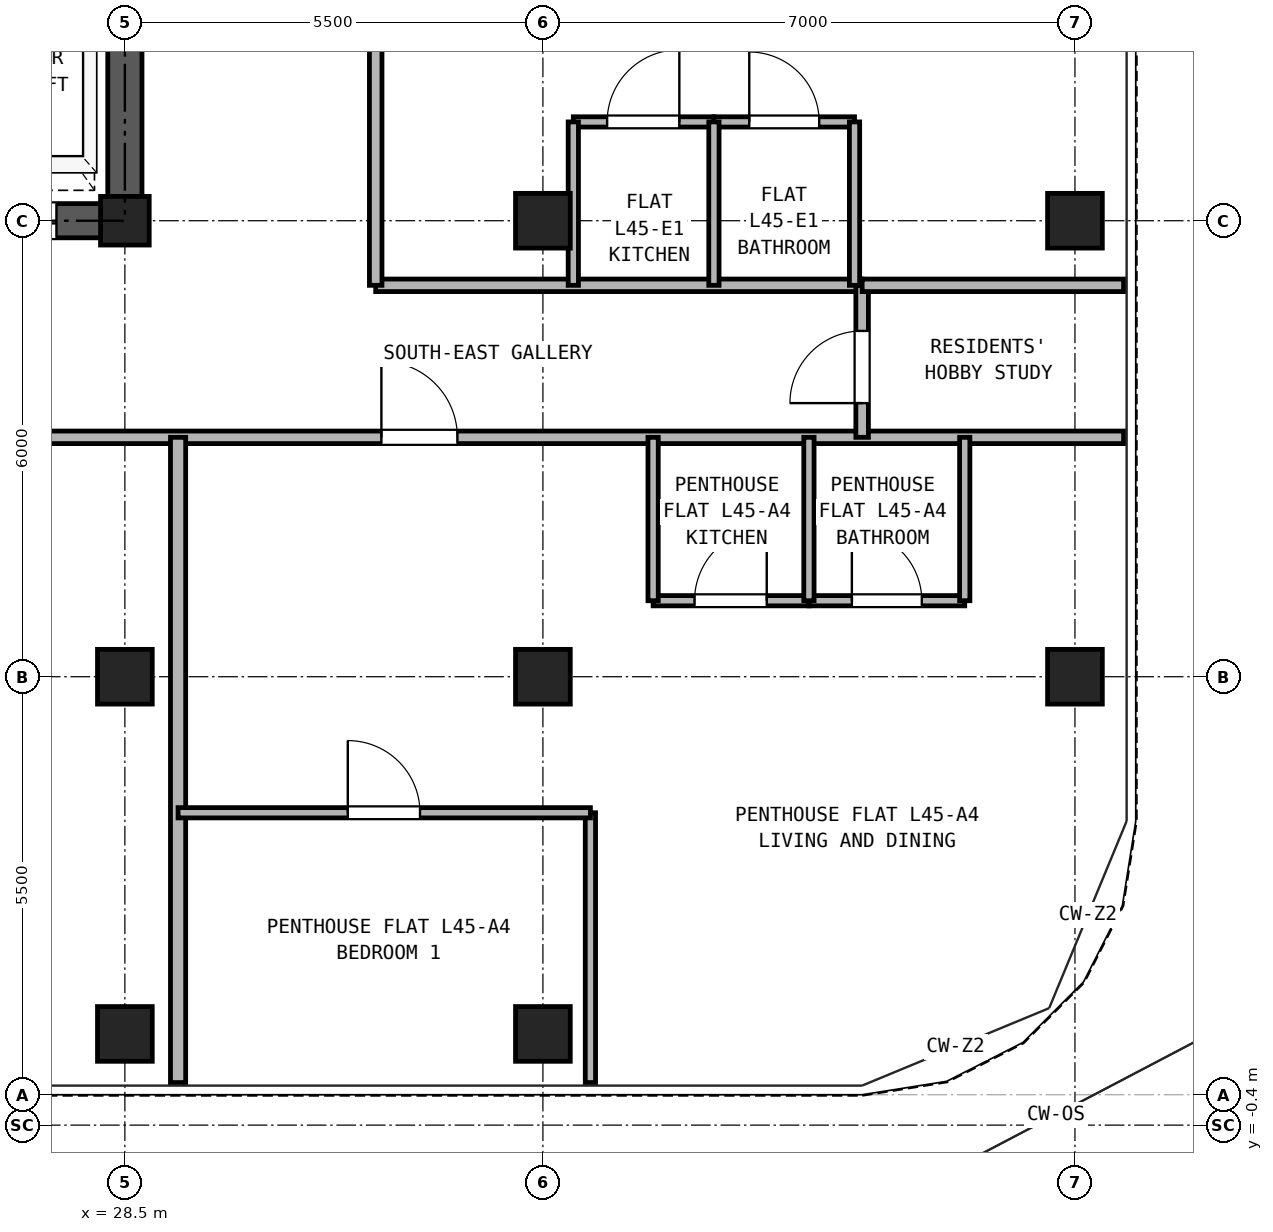
"""IFC4 building model, lengths in metres.
Left out: names, types, materials, properties, quantities, classifications, styles, units other than length and angle.
Written with IfcOpenShell. Run it as: python <this file> out.ifc"""

import sys

from ifc_helpers import new_model, si_unit, direction, frame, frame_2d, origin, origin_2d, place, context, subcontext, project, spatial, rectangle, hollow_rectangle, extrude, source, transform, mapped, element, fill, save


model = new_model("IFC4")
c1 = context("Model", 3, precision=1e-05, world=origin(), true_north=direction((0.0, 1.0)))
c2 = subcontext(c1, "Body", "Model", "MODEL_VIEW")
j1 = project(units=[si_unit("LENGTHUNIT", "METRE"), si_unit("PLANEANGLEUNIT", "RADIAN")], contexts=[c1])
p1 = place(None, origin())
s1 = spatial("IfcSite", under=j1, at=p1, CompositionType="ELEMENT")
p2 = place(p1, origin())
s2 = spatial("IfcBuilding", under=s1, at=p2, CompositionType="ELEMENT")
p3 = place(p2, frame((0.0, 0.0, 162.5)))
s3 = spatial("IfcBuildingStorey", under=s2, at=p3, CompositionType="ELEMENT", Elevation=162.5)
m1 = source(origin(), c2, "Body", "SweptSolid", [
    extrude(hollow_rectangle(XDim=0.72, YDim=0.72, WallThickness=0.04, at=origin_2d()), origin(), (0.0, 0.0, 1.0), 2.95),
])
for number, where, z_axis, x_axis in (
    (1, (28.5, 0.8, 0.0), (0.0, 0.0, 1.0), (1.0, 0.0, 0.0)),
    (2, (34.0, 0.8, 0.0), (0.0, 0.0, 1.0), (1.0, 0.0, 0.0)),
    (3, (41.0, 5.5, 0.0), (0.0, 0.0, 1.0), (1.0, 0.0, 0.0)),
    (4, (41.0, 11.5, 0.0), (0.0, 0.0, 1.0), (1.0, 0.0, 0.0)),
    (5, (28.5, 5.5, 0.0), (0.0, 0.0, 1.0), (1.0, 0.0, 0.0)),
):
    element("IfcColumn", number, at=place(p3, frame(where, z_axis=z_axis, x_axis=x_axis)), inside=s3, PredefinedType="COLUMN", context=c2, shape_type="MappedRepresentation", body=[
        mapped(m1, transform((0.0, 0.0, 0.0), x_axis=(1.0, 0.0, 0.0), y_axis=(0.0, 1.0, 0.0), z_axis=(0.0, 0.0, 1.0), scale=1.0)),
    ])
m2 = source(origin(), c2, "Body", "SweptSolid", [
    extrude(hollow_rectangle(XDim=0.64, YDim=0.64, WallThickness=0.035, at=origin_2d()), origin(), (0.0, 0.0, 1.0), 2.95),
])
p4 = place(p3, frame((28.5, 11.5, 0.0), z_axis=(0.0, 0.0, 1.0), x_axis=(1.0, 0.0, 0.0)))
e6 = element("IfcColumn", 6, at=p4, inside=s3, PredefinedType="COLUMN", context=c2, shape_type="MappedRepresentation", body=[
    mapped(m2, transform((0.0, 0.0, 0.0), x_axis=(1.0, 0.0, 0.0), y_axis=(0.0, 1.0, 0.0), z_axis=(0.0, 0.0, 1.0), scale=1.0)),
])
for number, where, z_axis, x_axis in (
    (7, (34.0, 5.5, 0.0), (0.0, 0.0, 1.0), (1.0, 0.0, 0.0)),
    (8, (34.0, 11.5, 0.0), (0.0, 0.0, 1.0), (1.0, 0.0, 0.0)),
):
    element("IfcColumn", number, at=place(p3, frame(where, z_axis=z_axis, x_axis=x_axis)), inside=s3, PredefinedType="COLUMN", context=c2, shape_type="MappedRepresentation", body=[
        mapped(m1, transform((0.0, 0.0, 0.0), x_axis=(1.0, 0.0, 0.0), y_axis=(0.0, 1.0, 0.0), z_axis=(0.0, 0.0, 1.0), scale=1.0)),
    ])
p5 = place(p3, frame((18.275, 11.5, 0.0), z_axis=(0.0, 0.0, 1.0), x_axis=(1.0, 0.0, 0.0)))
e9 = element("IfcWall", 9, at=p5, inside=s3, PredefinedType="SHEAR", context=c2, shape_type="SweptSolid", body=[
    extrude(rectangle(XDim=10.45, YDim=0.45, at=frame_2d((5.225, 0.0))), origin(), (0.0, 0.0, 1.0), 2.95),
])
p6 = place(p5, frame((1.825, 0.0, 0.0)))
e10 = element("IfcOpeningElement", 10, at=p6, cuts=e9, PredefinedType="OPENING", context=c2, shape_type="SweptSolid", body=[
    extrude(rectangle(XDim=0.95, YDim=2.15, at=frame_2d((0.475, 1.075))), frame((0.0, 0.235, 0.0), z_axis=(0.0, -1.0, 0.0), x_axis=(1.0, 0.0, 0.0)), (0.0, 0.0, 1.0), 0.47),
])
p7 = place(p5, frame((5.325, 0.0, 0.0)))
e11 = element("IfcOpeningElement", 11, at=p7, cuts=e9, PredefinedType="OPENING", context=c2, shape_type="SweptSolid", body=[
    extrude(rectangle(XDim=0.95, YDim=2.15, at=frame_2d((0.475, 1.075))), frame((0.0, 0.235, 0.0), z_axis=(0.0, -1.0, 0.0), x_axis=(1.0, 0.0, 0.0)), (0.0, 0.0, 1.0), 0.47),
])
p8 = place(p5, frame((8.225, 0.0, 0.0)))
e12 = element("IfcOpeningElement", 12, at=p8, cuts=e9, PredefinedType="OPENING", context=c2, shape_type="SweptSolid", body=[
    extrude(rectangle(XDim=1.1, YDim=2.25, at=frame_2d((0.55, 1.125))), frame((0.0, 0.235, 0.0), z_axis=(0.0, -1.0, 0.0), x_axis=(1.0, 0.0, 0.0)), (0.0, 0.0, 1.0), 0.47),
])
p9 = place(p3, frame((28.5, 11.725, 0.0), z_axis=(0.0, 0.0, 1.0), x_axis=(0.0, 1.0, 0.0)))
e13 = element("IfcWall", 13, at=p9, inside=s3, PredefinedType="SHEAR", context=c2, shape_type="SweptSolid", body=[
    extrude(rectangle(XDim=16.8, YDim=0.45, at=frame_2d((8.4, 0.0))), origin(), (0.0, 0.0, 1.0), 2.95),
])
p10 = place(p9, frame((7.425, 0.0, 0.0)))
e14 = element("IfcOpeningElement", 14, at=p10, cuts=e13, PredefinedType="OPENING", context=c2, shape_type="SweptSolid", body=[
    extrude(rectangle(XDim=1.15, YDim=2.2, at=frame_2d((0.575, 1.1))), frame((0.0, 0.235, 0.0), z_axis=(0.0, -1.0, 0.0), x_axis=(1.0, 0.0, 0.0)), (0.0, 0.0, 1.0), 0.47),
])
p11 = place(p3, frame((0.16, 8.65, 0.0), z_axis=(0.0, 0.0, 1.0), x_axis=(1.0, 0.0, 0.0)))
e15 = element("IfcWall", 15, at=p11, inside=s3, PredefinedType="PARTITIONING", context=c2, shape_type="SweptSolid", body=[
    extrude(rectangle(XDim=41.48, YDim=0.165, at=frame_2d((20.74, 0.0))), origin(), (0.0, 0.0, 1.0), 2.583),
])
p12 = place(p11, frame((9.39, 0.0, 0.0)))
e16 = element("IfcOpeningElement", 16, at=p12, cuts=e15, PredefinedType="OPENING", context=c2, shape_type="SweptSolid", body=[
    extrude(rectangle(XDim=1.0, YDim=2.15, at=frame_2d((0.5, 1.075))), frame((0.0, 0.093, 0.0), z_axis=(0.0, -1.0, 0.0), x_axis=(1.0, 0.0, 0.0)), (0.0, 0.0, 1.0), 0.185),
])
p13 = place(p11, frame((18.965, 0.0, 0.0)))
e17 = element("IfcOpeningElement", 17, at=p13, cuts=e15, PredefinedType="OPENING", context=c2, shape_type="SweptSolid", body=[
    extrude(rectangle(XDim=1.0, YDim=2.15, at=frame_2d((0.5, 1.075))), frame((0.0, 0.093, 0.0), z_axis=(0.0, -1.0, 0.0), x_axis=(1.0, 0.0, 0.0)), (0.0, 0.0, 1.0), 0.185),
])
p14 = place(p11, frame((26.34, 0.0, 0.0)))
e18 = element("IfcOpeningElement", 18, at=p14, cuts=e15, PredefinedType="OPENING", context=c2, shape_type="SweptSolid", body=[
    extrude(rectangle(XDim=1.0, YDim=2.15, at=frame_2d((0.5, 1.075))), frame((0.0, 0.093, 0.0), z_axis=(0.0, -1.0, 0.0), x_axis=(1.0, 0.0, 0.0)), (0.0, 0.0, 1.0), 0.185),
])
p15 = place(p11, frame((31.715, 0.0, 0.0)))
e19 = element("IfcOpeningElement", 19, at=p15, cuts=e15, PredefinedType="OPENING", context=c2, shape_type="SweptSolid", body=[
    extrude(rectangle(XDim=1.0, YDim=2.15, at=frame_2d((0.5, 1.075))), frame((0.0, 0.093, 0.0), z_axis=(0.0, -1.0, 0.0), x_axis=(1.0, 0.0, 0.0)), (0.0, 0.0, 1.0), 0.185),
])
p16 = place(p3, frame((31.8, 10.65, 0.0), z_axis=(0.0, 0.0, 1.0), x_axis=(1.0, 0.0, 0.0)))
e20 = element("IfcWall", 20, at=p16, inside=s3, PredefinedType="PARTITIONING", context=c2, shape_type="SweptSolid", body=[
    extrude(rectangle(XDim=6.4, YDim=0.165, at=frame_2d((3.2, 0.0))), origin(), (0.0, 0.0, 1.0), 2.95),
])
p17 = place(p3, frame((38.2, 8.65, 0.0), z_axis=(0.0, 0.0, 1.0), x_axis=(0.0, 1.0, 0.0)))
e21 = element("IfcWall", 21, at=p17, inside=s3, PredefinedType="PARTITIONING", context=c2, shape_type="SweptSolid", body=[
    extrude(rectangle(XDim=2.0, YDim=0.165, at=frame_2d((1.0, 0.0))), origin(), (0.0, 0.0, 1.0), 2.95),
])
p18 = place(p17, frame((0.45, 0.0, 0.0)))
e22 = element("IfcOpeningElement", 22, at=p18, cuts=e21, PredefinedType="OPENING", context=c2, shape_type="SweptSolid", body=[
    extrude(rectangle(XDim=0.95, YDim=2.15, at=frame_2d((0.475, 1.075))), frame((0.0, 0.093, 0.0), z_axis=(0.0, -1.0, 0.0), x_axis=(1.0, 0.0, 0.0)), (0.0, 0.0, 1.0), 0.185),
])
p19 = place(p3, frame((31.8, 10.65, 0.0), z_axis=(0.0, 0.0, 1.0), x_axis=(0.0, 1.0, 0.0)))
e23 = element("IfcWall", 23, at=p19, inside=s3, PredefinedType="PARTITIONING", context=c2, shape_type="SweptSolid", body=[
    extrude(rectangle(XDim=24.49, YDim=0.165, at=frame_2d((12.245, 0.0))), origin(), (0.0, 0.0, 1.0), 2.95),
])
p20 = place(p19, frame((3.425, 0.0, 0.0)))
e24 = element("IfcOpeningElement", 24, at=p20, cuts=e23, PredefinedType="OPENING", context=c2, shape_type="SweptSolid", body=[
    extrude(rectangle(XDim=1.0, YDim=2.15, at=frame_2d((0.5, 1.075))), frame((0.0, 0.093, 0.0), z_axis=(0.0, -1.0, 0.0), x_axis=(1.0, 0.0, 0.0)), (0.0, 0.0, 1.0), 0.185),
])
p21 = place(p19, frame((11.6, 0.0, 0.0)))
e25 = element("IfcOpeningElement", 25, at=p21, cuts=e23, PredefinedType="OPENING", context=c2, shape_type="SweptSolid", body=[
    extrude(rectangle(XDim=1.0, YDim=2.15, at=frame_2d((0.5, 1.075))), frame((0.0, 0.093, 0.0), z_axis=(0.0, -1.0, 0.0), x_axis=(1.0, 0.0, 0.0)), (0.0, 0.0, 1.0), 0.185),
])
p22 = place(p19, frame((18.25, 0.0, 0.0)))
e26 = element("IfcOpeningElement", 26, at=p22, cuts=e23, PredefinedType="OPENING", context=c2, shape_type="SweptSolid", body=[
    extrude(rectangle(XDim=1.0, YDim=2.15, at=frame_2d((0.5, 1.075))), frame((0.0, 0.093, 0.0), z_axis=(0.0, -1.0, 0.0), x_axis=(1.0, 0.0, 0.0)), (0.0, 0.0, 1.0), 0.185),
])
p23 = place(p3, frame((29.2, 0.16, 0.0), z_axis=(0.0, 0.0, 1.0), x_axis=(0.0, 1.0, 0.0)))
e27 = element("IfcWall", 27, at=p23, inside=s3, PredefinedType="PARTITIONING", context=c2, shape_type="SweptSolid", body=[
    extrude(rectangle(XDim=8.49, YDim=0.2, at=frame_2d((4.245, 0.0))), origin(), (0.0, 0.0, 1.0), 2.95),
])
p24 = place(p3, frame((35.45, 6.5, 0.0), z_axis=(0.0, 0.0, 1.0), x_axis=(1.0, 0.0, 0.0)))
e28 = element("IfcWall", 28, at=p24, inside=s3, PredefinedType="PARTITIONING", context=c2, shape_type="SweptSolid", body=[
    extrude(rectangle(XDim=2.05, YDim=0.135, at=frame_2d((1.025, 0.0))), origin(), (0.0, 0.0, 1.0), 2.95),
])
p25 = place(p24, frame((0.545, 0.0, 0.0)))
e29 = element("IfcOpeningElement", 29, at=p25, cuts=e28, PredefinedType="OPENING", context=c2, shape_type="SweptSolid", body=[
    extrude(rectangle(XDim=0.95, YDim=2.15, at=frame_2d((0.475, 1.075))), frame((0.0, 0.077, 0.0), z_axis=(0.0, -1.0, 0.0), x_axis=(1.0, 0.0, 0.0)), (0.0, 0.0, 1.0), 0.155),
])
p26 = place(p3, frame((37.5, 6.5, 0.0), z_axis=(0.0, 0.0, 1.0), x_axis=(1.0, 0.0, 0.0)))
e30 = element("IfcWall", 30, at=p26, inside=s3, PredefinedType="PARTITIONING", context=c2, shape_type="SweptSolid", body=[
    extrude(rectangle(XDim=2.05, YDim=0.135, at=frame_2d((1.025, 0.0))), origin(), (0.0, 0.0, 1.0), 2.95),
])
p27 = place(p26, frame((0.565, 0.0, 0.0)))
e31 = element("IfcOpeningElement", 31, at=p27, cuts=e30, PredefinedType="OPENING", context=c2, shape_type="SweptSolid", body=[
    extrude(rectangle(XDim=0.92, YDim=2.1, at=frame_2d((0.46, 1.05))), frame((0.0, 0.077, 0.0), z_axis=(0.0, -1.0, 0.0), x_axis=(1.0, 0.0, 0.0)), (0.0, 0.0, 1.0), 0.155),
])
for number, where, z_axis, x_axis in (
    (32, (35.45, 6.5, 0.0), (0.0, 0.0, 1.0), (0.0, 1.0, 0.0)),
    (33, (37.5, 6.5, 0.0), (0.0, 0.0, 1.0), (0.0, 1.0, 0.0)),
    (34, (39.55, 6.5, 0.0), (0.0, 0.0, 1.0), (0.0, 1.0, 0.0)),
):
    element("IfcWall", number, at=place(p3, frame(where, z_axis=z_axis, x_axis=x_axis)), inside=s3, PredefinedType="PARTITIONING", context=c2, shape_type="SweptSolid", body=[
        extrude(rectangle(XDim=2.15, YDim=0.135, at=frame_2d((1.075, 0.0))), origin(), (0.0, 0.0, 1.0), 2.95),
    ])
p28 = place(p3, frame((34.625, 0.16, 0.0), z_axis=(0.0, 0.0, 1.0), x_axis=(0.0, 1.0, 0.0)))
e35 = element("IfcWall", 35, at=p28, inside=s3, PredefinedType="PARTITIONING", context=c2, shape_type="SweptSolid", body=[
    extrude(rectangle(XDim=3.55, YDim=0.135, at=frame_2d((1.775, 0.0))), origin(), (0.0, 0.0, 1.0), 2.95),
])
p29 = place(p3, frame((29.2, 3.71, 0.0), z_axis=(0.0, 0.0, 1.0), x_axis=(1.0, 0.0, 0.0)))
e36 = element("IfcWall", 36, at=p29, inside=s3, PredefinedType="PARTITIONING", context=c2, shape_type="SweptSolid", body=[
    extrude(rectangle(XDim=5.425, YDim=0.135, at=frame_2d((2.712, 0.0))), origin(), (0.0, 0.0, 1.0), 2.95),
])
p30 = place(p29, frame((2.233, 0.0, 0.0)))
e37 = element("IfcOpeningElement", 37, at=p30, cuts=e36, PredefinedType="OPENING", context=c2, shape_type="SweptSolid", body=[
    extrude(rectangle(XDim=0.95, YDim=2.15, at=frame_2d((0.475, 1.075))), frame((0.0, 0.077, 0.0), z_axis=(0.0, -1.0, 0.0), x_axis=(1.0, 0.0, 0.0)), (0.0, 0.0, 1.0), 0.155),
])
p31 = place(p3, frame((38.2, 10.65, 0.0), z_axis=(0.0, 0.0, 1.0), x_axis=(1.0, 0.0, 0.0)))
e38 = element("IfcWall", 38, at=p31, inside=s3, PredefinedType="PARTITIONING", context=c2, shape_type="SweptSolid", body=[
    extrude(rectangle(XDim=3.44, YDim=0.165, at=frame_2d((1.72, 0.0))), origin(), (0.0, 0.0, 1.0), 2.95),
])
p32 = place(p3, frame((34.4, 12.8, 0.0), z_axis=(0.0, 0.0, 1.0), x_axis=(1.0, 0.0, 0.0)))
e39 = element("IfcWall", 39, at=p32, inside=s3, PredefinedType="PARTITIONING", context=c2, shape_type="SweptSolid", body=[
    extrude(rectangle(XDim=1.85, YDim=0.135, at=frame_2d((0.925, 0.0))), origin(), (0.0, 0.0, 1.0), 2.95),
])
p33 = place(p32, frame((0.445, 0.0, 0.0)))
e40 = element("IfcOpeningElement", 40, at=p33, cuts=e39, PredefinedType="OPENING", context=c2, shape_type="SweptSolid", body=[
    extrude(rectangle(XDim=0.95, YDim=2.15, at=frame_2d((0.475, 1.075))), frame((0.0, 0.077, 0.0), z_axis=(0.0, -1.0, 0.0), x_axis=(1.0, 0.0, 0.0)), (0.0, 0.0, 1.0), 0.155),
])
p34 = place(p3, frame((36.25, 12.8, 0.0), z_axis=(0.0, 0.0, 1.0), x_axis=(1.0, 0.0, 0.0)))
e41 = element("IfcWall", 41, at=p34, inside=s3, PredefinedType="PARTITIONING", context=c2, shape_type="SweptSolid", body=[
    extrude(rectangle(XDim=1.85, YDim=0.135, at=frame_2d((0.925, 0.0))), origin(), (0.0, 0.0, 1.0), 2.95),
])
p35 = place(p34, frame((0.465, 0.0, 0.0)))
e42 = element("IfcOpeningElement", 42, at=p35, cuts=e41, PredefinedType="OPENING", context=c2, shape_type="SweptSolid", body=[
    extrude(rectangle(XDim=0.92, YDim=2.1, at=frame_2d((0.46, 1.05))), frame((0.0, 0.077, 0.0), z_axis=(0.0, -1.0, 0.0), x_axis=(1.0, 0.0, 0.0)), (0.0, 0.0, 1.0), 0.155),
])
for number, where, z_axis, x_axis in (
    (43, (34.4, 10.65, 0.0), (0.0, 0.0, 1.0), (0.0, 1.0, 0.0)),
    (44, (36.25, 10.65, 0.0), (0.0, 0.0, 1.0), (0.0, 1.0, 0.0)),
    (45, (38.1, 10.65, 0.0), (0.0, 0.0, 1.0), (0.0, 1.0, 0.0)),
):
    element("IfcWall", number, at=place(p3, frame(where, z_axis=z_axis, x_axis=x_axis)), inside=s3, PredefinedType="PARTITIONING", context=c2, shape_type="SweptSolid", body=[
        extrude(rectangle(XDim=2.15, YDim=0.135, at=frame_2d((1.075, 0.0))), origin(), (0.0, 0.0, 1.0), 2.95),
    ])
p36 = place(p8, frame((1.1, 0.0, 0.0), z_axis=(0.0, 0.0, 1.0), x_axis=(-1.0, 0.0, 0.0)))
e46 = element("IfcDoor", 46, at=p36, inside=s3, OperationType="DOUBLE_DOOR_SLIDING", PredefinedType="DOOR", context=c2, shape_type="SweptSolid", body=[
    extrude(rectangle(XDim=1.1, YDim=2.25, at=frame_2d((0.55, 1.125))), frame((0.0, 0.025, 0.0), z_axis=(0.0, -1.0, 0.0), x_axis=(1.0, 0.0, 0.0)), (0.0, 0.0, 1.0), 0.05),
])
fill(e12, e46)
p37 = place(p25, origin())
e47 = element("IfcDoor", 47, at=p37, inside=s3, OperationType="SINGLE_SWING_RIGHT", PredefinedType="DOOR", context=c2, shape_type="SweptSolid", body=[
    extrude(rectangle(XDim=0.95, YDim=2.15, at=frame_2d((0.475, 1.075))), frame((0.0, 0.025, 0.0), z_axis=(0.0, -1.0, 0.0), x_axis=(1.0, 0.0, 0.0)), (0.0, 0.0, 1.0), 0.05),
])
fill(e29, e47)
p38 = place(p27, origin())
e48 = element("IfcDoor", 48, at=p38, inside=s3, OperationType="SINGLE_SWING_LEFT", PredefinedType="DOOR", context=c2, shape_type="SweptSolid", body=[
    extrude(rectangle(XDim=0.92, YDim=2.1, at=frame_2d((0.46, 1.05))), frame((0.0, 0.025, 0.0), z_axis=(0.0, -1.0, 0.0), x_axis=(1.0, 0.0, 0.0)), (0.0, 0.0, 1.0), 0.05),
])
fill(e31, e48)
p39 = place(p30, frame((0.95, 0.0, 0.0), z_axis=(0.0, 0.0, 1.0), x_axis=(-1.0, 0.0, 0.0)))
e49 = element("IfcDoor", 49, at=p39, inside=s3, OperationType="SINGLE_SWING_LEFT", PredefinedType="DOOR", context=c2, shape_type="SweptSolid", body=[
    extrude(rectangle(XDim=0.95, YDim=2.15, at=frame_2d((0.475, 1.075))), frame((0.0, 0.025, 0.0), z_axis=(0.0, -1.0, 0.0), x_axis=(1.0, 0.0, 0.0)), (0.0, 0.0, 1.0), 0.05),
])
fill(e37, e49)
p40 = place(p15, frame((1.0, 0.0, 0.0), z_axis=(0.0, 0.0, 1.0), x_axis=(-1.0, 0.0, 0.0)))
e50 = element("IfcDoor", 50, at=p40, inside=s3, OperationType="SINGLE_SWING_LEFT", PredefinedType="DOOR", context=c2, shape_type="SweptSolid", body=[
    extrude(rectangle(XDim=1.0, YDim=2.15, at=frame_2d((0.5, 1.075))), frame((0.0, 0.025, 0.0), z_axis=(0.0, -1.0, 0.0), x_axis=(1.0, 0.0, 0.0)), (0.0, 0.0, 1.0), 0.05),
])
fill(e19, e50)
p41 = place(p18, origin())
e51 = element("IfcDoor", 51, at=p41, inside=s3, OperationType="SINGLE_SWING_LEFT", PredefinedType="DOOR", context=c2, shape_type="SweptSolid", body=[
    extrude(rectangle(XDim=0.95, YDim=2.15, at=frame_2d((0.475, 1.075))), frame((0.0, 0.025, 0.0), z_axis=(0.0, -1.0, 0.0), x_axis=(1.0, 0.0, 0.0)), (0.0, 0.0, 1.0), 0.05),
])
fill(e22, e51)
p42 = place(p33, origin())
e52 = element("IfcDoor", 52, at=p42, inside=s3, OperationType="SINGLE_SWING_RIGHT", PredefinedType="DOOR", context=c2, shape_type="SweptSolid", body=[
    extrude(rectangle(XDim=0.95, YDim=2.15, at=frame_2d((0.475, 1.075))), frame((0.0, 0.025, 0.0), z_axis=(0.0, -1.0, 0.0), x_axis=(1.0, 0.0, 0.0)), (0.0, 0.0, 1.0), 0.05),
])
fill(e40, e52)
p43 = place(p35, origin())
e53 = element("IfcDoor", 53, at=p43, inside=s3, OperationType="SINGLE_SWING_LEFT", PredefinedType="DOOR", context=c2, shape_type="SweptSolid", body=[
    extrude(rectangle(XDim=0.92, YDim=2.1, at=frame_2d((0.46, 1.05))), frame((0.0, 0.025, 0.0), z_axis=(0.0, -1.0, 0.0), x_axis=(1.0, 0.0, 0.0)), (0.0, 0.0, 1.0), 0.05),
])
fill(e42, e53)
save(model, sys.argv[1])
